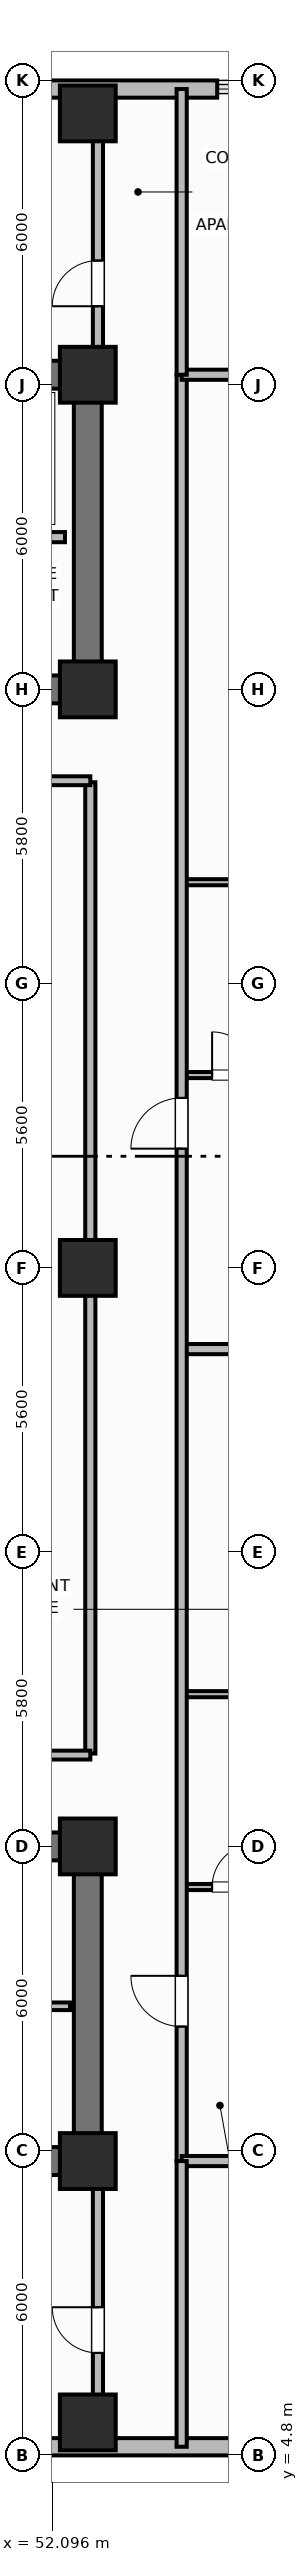
"""IFC4 building model, lengths in metres.
Left out: names, types, materials, properties, quantities, classifications, styles, units other than length and angle.
Written with IfcOpenShell. Run it as: python <this file> out.ifc"""

import sys

from ifc_helpers import new_model, si_unit, direction, frame, frame_2d, origin, origin_2d, place, context, subcontext, project, spatial, rectangle, extrude, element, fill, save


model = new_model("IFC4")
c1 = context("Model", 3, precision=1e-05, world=origin(), true_north=direction((0.0, 1.0)))
c2 = subcontext(c1, "Body", "Model", "MODEL_VIEW")
j1 = project(units=[si_unit("LENGTHUNIT", "METRE"), si_unit("PLANEANGLEUNIT", "RADIAN")], contexts=[c1])
p1 = place(None, origin())
s1 = spatial("IfcSite", under=j1, at=p1, CompositionType="ELEMENT")
p2 = place(p1, origin())
s2 = spatial("IfcBuilding", under=s1, at=p2, CompositionType="ELEMENT")
p3 = place(p2, frame((0.0, 0.0, 99.4)))
s3 = spatial("IfcBuildingStorey", under=s2, at=p3, CompositionType="ELEMENT", Elevation=99.4)
p4 = place(p3, frame((52.8, 10.6, 0.0), z_axis=(0.0, 0.0, 1.0), x_axis=(-1.0, 0.0, 0.0)))
e1 = element("IfcWall", 1, at=p4, inside=s3, PredefinedType="SHEAR", context=c2, shape_type="SweptSolid", body=[
    extrude(rectangle(XDim=27.2, YDim=0.55, at=frame_2d((13.6, 0.0))), origin(), (0.0, 0.0, 1.0), 3.7),
])
p5 = place(p3, frame((52.8, 10.875, 0.0), z_axis=(0.0, 0.0, 1.0), x_axis=(0.0, 1.0, 0.0)))
e2 = element("IfcWall", 2, at=p5, inside=s3, PredefinedType="SHEAR", context=c2, shape_type="SweptSolid", body=[
    extrude(rectangle(XDim=5.65, YDim=0.55, at=frame_2d((2.825, 0.0))), origin(), (0.0, 0.0, 1.0), 3.7),
])
p6 = place(p3, frame((25.6, 16.8, 0.0), z_axis=(0.0, 0.0, 1.0), x_axis=(1.0, 0.0, 0.0)))
e3 = element("IfcWall", 3, at=p6, inside=s3, PredefinedType="SHEAR", context=c2, shape_type="SweptSolid", body=[
    extrude(rectangle(XDim=27.2, YDim=0.55, at=frame_2d((13.6, 0.0))), origin(), (0.0, 0.0, 1.0), 3.7),
])
p7 = place(p6, frame((1.7, 0.0, 0.0)))
e4 = element("IfcOpeningElement", 4, at=p7, cuts=e3, PredefinedType="OPENING", context=c2, shape_type="SweptSolid", body=[
    extrude(rectangle(XDim=1.1, YDim=2.15, at=frame_2d((0.55, 1.075))), frame((0.0, 0.285, 0.0), z_axis=(0.0, -1.0, 0.0), x_axis=(1.0, 0.0, 0.0)), (0.0, 0.0, 1.0), 0.57),
])
p8 = place(p6, frame((4.45, 0.0, 0.0)))
e5 = element("IfcOpeningElement", 5, at=p8, cuts=e3, PredefinedType="OPENING", context=c2, shape_type="SweptSolid", body=[
    extrude(rectangle(XDim=0.85, YDim=2.1, at=frame_2d((0.425, 1.05))), frame((0.0, 0.285, 0.0), z_axis=(0.0, -1.0, 0.0), x_axis=(1.0, 0.0, 0.0)), (0.0, 0.0, 1.0), 0.57),
])
p9 = place(p6, frame((6.5, 0.0, 0.0)))
e6 = element("IfcOpeningElement", 6, at=p9, cuts=e3, PredefinedType="OPENING", context=c2, shape_type="SweptSolid", body=[
    extrude(rectangle(XDim=0.85, YDim=2.1, at=frame_2d((0.425, 1.05))), frame((0.0, 0.285, 0.0), z_axis=(0.0, -1.0, 0.0), x_axis=(1.0, 0.0, 0.0)), (0.0, 0.0, 1.0), 0.57),
])
p10 = place(p6, frame((13.0, 0.0, 0.0)))
e7 = element("IfcOpeningElement", 7, at=p10, cuts=e3, PredefinedType="OPENING", context=c2, shape_type="SweptSolid", body=[
    extrude(rectangle(XDim=1.2, YDim=2.15, at=frame_2d((0.6, 1.075))), frame((0.0, 0.285, 0.0), z_axis=(0.0, -1.0, 0.0), x_axis=(1.0, 0.0, 0.0)), (0.0, 0.0, 1.0), 0.57),
])
p11 = place(p6, frame((19.8, 0.0, 0.0)))
e8 = element("IfcOpeningElement", 8, at=p11, cuts=e3, PredefinedType="OPENING", context=c2, shape_type="SweptSolid", body=[
    extrude(rectangle(XDim=0.85, YDim=2.1, at=frame_2d((0.425, 1.05))), frame((0.0, 0.285, 0.0), z_axis=(0.0, -1.0, 0.0), x_axis=(1.0, 0.0, 0.0)), (0.0, 0.0, 1.0), 0.57),
])
p12 = place(p6, frame((24.2, 0.0, 0.0)))
e9 = element("IfcOpeningElement", 9, at=p12, cuts=e3, PredefinedType="OPENING", context=c2, shape_type="SweptSolid", body=[
    extrude(rectangle(XDim=0.85, YDim=2.1, at=frame_2d((0.425, 1.05))), frame((0.0, 0.285, 0.0), z_axis=(0.0, -1.0, 0.0), x_axis=(1.0, 0.0, 0.0)), (0.0, 0.0, 1.0), 0.57),
])
p13 = place(p3, frame((25.6, 45.8, 0.0), z_axis=(0.0, 0.0, 1.0), x_axis=(1.0, 0.0, 0.0)))
e10 = element("IfcWall", 10, at=p13, inside=s3, PredefinedType="SHEAR", context=c2, shape_type="SweptSolid", body=[
    extrude(rectangle(XDim=27.2, YDim=0.55, at=frame_2d((13.6, 0.0))), origin(), (0.0, 0.0, 1.0), 3.7),
])
p14 = place(p3, frame((52.8, 39.875, 0.0), z_axis=(0.0, 0.0, 1.0), x_axis=(0.0, 1.0, 0.0)))
e11 = element("IfcWall", 11, at=p14, inside=s3, PredefinedType="SHEAR", context=c2, shape_type="SweptSolid", body=[
    extrude(rectangle(XDim=5.65, YDim=0.55, at=frame_2d((2.825, 0.0))), origin(), (0.0, 0.0, 1.0), 3.7),
])
p15 = place(p3, frame((52.8, 39.6, 0.0), z_axis=(0.0, 0.0, 1.0), x_axis=(-1.0, 0.0, 0.0)))
e12 = element("IfcWall", 12, at=p15, inside=s3, PredefinedType="SHEAR", context=c2, shape_type="SweptSolid", body=[
    extrude(rectangle(XDim=27.2, YDim=0.55, at=frame_2d((13.6, 0.0))), origin(), (0.0, 0.0, 1.0), 3.7),
])
p16 = place(p15, frame((24.3, 0.0, 0.0)))
e13 = element("IfcOpeningElement", 13, at=p16, cuts=e12, PredefinedType="OPENING", context=c2, shape_type="SweptSolid", body=[
    extrude(rectangle(XDim=1.1, YDim=2.15, at=frame_2d((0.55, 1.075))), frame((0.0, 0.285, 0.0), z_axis=(0.0, -1.0, 0.0), x_axis=(1.0, 0.0, 0.0)), (0.0, 0.0, 1.0), 0.57),
])
p17 = place(p15, frame((21.85, 0.0, 0.0)))
e14 = element("IfcOpeningElement", 14, at=p17, cuts=e12, PredefinedType="OPENING", context=c2, shape_type="SweptSolid", body=[
    extrude(rectangle(XDim=0.85, YDim=2.1, at=frame_2d((0.425, 1.05))), frame((0.0, 0.285, 0.0), z_axis=(0.0, -1.0, 0.0), x_axis=(1.0, 0.0, 0.0)), (0.0, 0.0, 1.0), 0.57),
])
p18 = place(p15, frame((19.85, 0.0, 0.0)))
e15 = element("IfcOpeningElement", 15, at=p18, cuts=e12, PredefinedType="OPENING", context=c2, shape_type="SweptSolid", body=[
    extrude(rectangle(XDim=0.85, YDim=2.1, at=frame_2d((0.425, 1.05))), frame((0.0, 0.285, 0.0), z_axis=(0.0, -1.0, 0.0), x_axis=(1.0, 0.0, 0.0)), (0.0, 0.0, 1.0), 0.57),
])
p19 = place(p15, frame((15.1, 0.0, 0.0)))
e16 = element("IfcOpeningElement", 16, at=p19, cuts=e12, PredefinedType="OPENING", context=c2, shape_type="SweptSolid", body=[
    extrude(rectangle(XDim=1.2, YDim=2.15, at=frame_2d((0.6, 1.075))), frame((0.0, 0.285, 0.0), z_axis=(0.0, -1.0, 0.0), x_axis=(1.0, 0.0, 0.0)), (0.0, 0.0, 1.0), 0.57),
])
p20 = place(p15, frame((11.3, 0.0, 0.0)))
e17 = element("IfcOpeningElement", 17, at=p20, cuts=e12, PredefinedType="OPENING", context=c2, shape_type="SweptSolid", body=[
    extrude(rectangle(XDim=1.3, YDim=2.2, at=frame_2d((0.65, 1.1))), frame((0.0, 0.285, 0.0), z_axis=(0.0, -1.0, 0.0), x_axis=(1.0, 0.0, 0.0)), (0.0, 0.0, 1.0), 0.57),
])
p21 = place(p15, frame((7.25, 0.0, 0.0)))
e18 = element("IfcOpeningElement", 18, at=p21, cuts=e12, PredefinedType="OPENING", context=c2, shape_type="SweptSolid", body=[
    extrude(rectangle(XDim=0.85, YDim=2.1, at=frame_2d((0.425, 1.05))), frame((0.0, 0.285, 0.0), z_axis=(0.0, -1.0, 0.0), x_axis=(1.0, 0.0, 0.0)), (0.0, 0.0, 1.0), 0.57),
])
p22 = place(p15, frame((4.6, 0.0, 0.0)))
e19 = element("IfcOpeningElement", 19, at=p22, cuts=e12, PredefinedType="OPENING", context=c2, shape_type="SweptSolid", body=[
    extrude(rectangle(XDim=0.85, YDim=2.1, at=frame_2d((0.425, 1.05))), frame((0.0, 0.285, 0.0), z_axis=(0.0, -1.0, 0.0), x_axis=(1.0, 0.0, 0.0)), (0.0, 0.0, 1.0), 0.57),
])
p23 = place(p15, frame((1.9, 0.0, 0.0)))
e20 = element("IfcOpeningElement", 20, at=p23, cuts=e12, PredefinedType="OPENING", context=c2, shape_type="SweptSolid", body=[
    extrude(rectangle(XDim=0.85, YDim=2.1, at=frame_2d((0.425, 1.05))), frame((0.0, 0.285, 0.0), z_axis=(0.0, -1.0, 0.0), x_axis=(1.0, 0.0, 0.0)), (0.0, 0.0, 1.0), 0.57),
])
for number, where, z_axis, x_axis in (
    (21, (52.8, 10.6, 0.0), (0.0, 0.0, 1.0), (1.0, 0.0, 0.0)),
    (22, (52.8, 16.8, 0.0), (0.0, 0.0, 1.0), (1.0, 0.0, 0.0)),
    (23, (52.8, 39.6, 0.0), (0.0, 0.0, 1.0), (1.0, 0.0, 0.0)),
    (24, (52.8, 45.8, 0.0), (0.0, 0.0, 1.0), (1.0, 0.0, 0.0)),
    (25, (52.8, 28.2, 0.0), (0.0, 0.0, 1.0), (1.0, 0.0, 0.0)),
    (26, (52.8, 5.45, 0.0), (0.0, 0.0, 1.0), (1.0, 0.0, 0.0)),
    (27, (52.8, 50.95, 0.0), (0.0, 0.0, 1.0), (1.0, 0.0, 0.0)),
):
    element("IfcColumn", number, at=place(p3, frame(where, z_axis=z_axis, x_axis=x_axis)), inside=s3, PredefinedType="COLUMN", context=c2, shape_type="SweptSolid", body=[
        extrude(rectangle(XDim=1.1, YDim=1.1, at=origin_2d()), origin(), (0.0, 0.0, 1.0), 3.7),
    ])
p24 = place(p3, frame((50.05, 4.97, 0.0), z_axis=(0.0, 0.0, 1.0), x_axis=(1.0, 0.0, 0.0)))
e28 = element("IfcWall", 28, at=p24, inside=s3, PredefinedType="SOLIDWALL", context=c2, shape_type="SweptSolid", body=[
    extrude(rectangle(XDim=9.75, YDim=0.34, at=frame_2d((4.875, 0.0))), origin(), (0.0, 0.0, 1.0), 2.7),
])
p25 = place(p24, frame((5.938, 0.0, 0.68)))
e29 = element("IfcOpeningElement", 29, at=p25, cuts=e28, PredefinedType="OPENING", context=c2, shape_type="SweptSolid", body=[
    extrude(rectangle(XDim=2.1, YDim=1.9, at=frame_2d((1.05, 0.95))), frame((0.0, 0.18, 0.0), z_axis=(0.0, -1.0, 0.0), x_axis=(1.0, 0.0, 0.0)), (0.0, 0.0, 1.0), 0.36),
])
p26 = place(p3, frame((55.35, 51.43, 0.0), z_axis=(0.0, 0.0, 1.0), x_axis=(-1.0, 0.0, 0.0)))
e30 = element("IfcWall", 30, at=p26, inside=s3, PredefinedType="SOLIDWALL", context=c2, shape_type="SweptSolid", body=[
    extrude(rectangle(XDim=12.95, YDim=0.34, at=frame_2d((6.475, 0.0))), origin(), (0.0, 0.0, 1.0), 2.7),
])
p27 = place(p26, frame((5.775, 0.0, 0.73)))
e31 = element("IfcOpeningElement", 31, at=p27, cuts=e30, PredefinedType="OPENING", context=c2, shape_type="SweptSolid", body=[
    extrude(rectangle(XDim=1.4, YDim=1.85, at=frame_2d((0.7, 0.925))), frame((0.0, 0.18, 0.0), z_axis=(0.0, -1.0, 0.0), x_axis=(1.0, 0.0, 0.0)), (0.0, 0.0, 1.0), 0.36),
])
p28 = place(p3, frame((48.05, 13.65, 0.0), z_axis=(0.0, 0.0, 1.0), x_axis=(1.0, 0.0, 0.0)))
e32 = element("IfcWall", 32, at=p28, inside=s3, PredefinedType="PARTITIONING", context=c2, shape_type="SweptSolid", body=[
    extrude(rectangle(XDim=4.4, YDim=0.15, at=frame_2d((2.2, 0.0))), origin(), (0.0, 0.0, 1.0), 2.53),
])
p29 = place(p28, frame((1.6, 0.0, 0.0)))
e33 = element("IfcOpeningElement", 33, at=p29, cuts=e32, PredefinedType="OPENING", context=c2, shape_type="SweptSolid", body=[
    extrude(rectangle(XDim=0.85, YDim=2.1, at=frame_2d((0.425, 1.05))), frame((0.0, 0.085, 0.0), z_axis=(0.0, -1.0, 0.0), x_axis=(1.0, 0.0, 0.0)), (0.0, 0.0, 1.0), 0.17),
])
p30 = place(p3, frame((52.35, 42.6, 0.0), z_axis=(0.0, 0.0, 1.0), x_axis=(-1.0, 0.0, 0.0)))
e34 = element("IfcWall", 34, at=p30, inside=s3, PredefinedType="PARTITIONING", context=c2, shape_type="SweptSolid", body=[
    extrude(rectangle(XDim=8.8, YDim=0.2, at=frame_2d((4.4, 0.0))), origin(), (0.0, 0.0, 1.0), 2.53),
])
p31 = place(p30, frame((7.1, 0.0, 0.0)))
e35 = element("IfcOpeningElement", 35, at=p31, cuts=e34, PredefinedType="OPENING", context=c2, shape_type="SweptSolid", body=[
    extrude(rectangle(XDim=1.0, YDim=2.15, at=frame_2d((0.5, 1.075))), frame((0.0, 0.11, 0.0), z_axis=(0.0, -1.0, 0.0), x_axis=(1.0, 0.0, 0.0)), (0.0, 0.0, 1.0), 0.22),
])
p32 = place(p3, frame((52.85, 18.63, 0.0), z_axis=(0.0, 0.0, 1.0), x_axis=(0.0, 1.0, 0.0)))
e36 = element("IfcWall", 36, at=p32, inside=s3, PredefinedType="PARTITIONING", context=c2, shape_type="SweptSolid", body=[
    extrude(rectangle(XDim=19.14, YDim=0.2, at=frame_2d((9.57, 0.0))), origin(), (0.0, 0.0, 1.0), 2.53),
])
for number, where, z_axis, x_axis in (
    (37, (46.35, 18.6, 0.0), (0.0, 0.0, 1.0), (1.0, 0.0, 0.0)),
    (38, (46.35, 37.8, 0.0), (0.0, 0.0, 1.0), (1.0, 0.0, 0.0)),
):
    element("IfcWall", number, at=place(p3, frame(where, z_axis=z_axis, x_axis=x_axis)), inside=s3, PredefinedType="PARTITIONING", context=c2, shape_type="SweptSolid", body=[
        extrude(rectangle(XDim=6.5, YDim=0.175, at=frame_2d((3.25, 0.0))), origin(), (0.0, 0.0, 1.0), 2.53),
    ])
p33 = place(p3, frame((54.65, 16.0, 0.0), z_axis=(0.0, 0.0, 1.0), x_axis=(1.0, 0.0, 0.0)))
e39 = element("IfcWall", 39, at=p33, inside=s3, PredefinedType="PARTITIONING", context=c2, shape_type="SweptSolid", body=[
    extrude(rectangle(XDim=2.25, YDim=0.12, at=frame_2d((1.125, 0.0))), origin(), (0.0, 0.0, 1.0), 2.53),
])
p34 = place(p33, frame((0.6, 0.0, 0.0)))
e40 = element("IfcOpeningElement", 40, at=p34, cuts=e39, PredefinedType="OPENING", context=c2, shape_type="SweptSolid", body=[
    extrude(rectangle(XDim=0.85, YDim=2.1, at=frame_2d((0.425, 1.05))), frame((0.0, 0.07, 0.0), z_axis=(0.0, -1.0, 0.0), x_axis=(1.0, 0.0, 0.0)), (0.0, 0.0, 1.0), 0.14),
])
p35 = place(p3, frame((54.65, 19.8, 0.0), z_axis=(0.0, 0.0, 1.0), x_axis=(1.0, 0.0, 0.0)))
e41 = element("IfcWall", 41, at=p35, inside=s3, PredefinedType="PARTITIONING", context=c2, shape_type="SweptSolid", body=[
    extrude(rectangle(XDim=2.25, YDim=0.12, at=frame_2d((1.125, 0.0))), origin(), (0.0, 0.0, 1.0), 2.53),
])
p36 = place(p3, frame((54.65, 26.6, 0.0), z_axis=(0.0, 0.0, 1.0), x_axis=(1.0, 0.0, 0.0)))
e42 = element("IfcWall", 42, at=p36, inside=s3, PredefinedType="PARTITIONING", context=c2, shape_type="SweptSolid", body=[
    extrude(rectangle(XDim=8.637, YDim=0.2, at=frame_2d((4.319, 0.0))), origin(), (0.0, 0.0, 1.0), 2.53),
])
p37 = place(p3, frame((54.65, 32.0, 0.0), z_axis=(0.0, 0.0, 1.0), x_axis=(1.0, 0.0, 0.0)))
e43 = element("IfcWall", 43, at=p37, inside=s3, PredefinedType="PARTITIONING", context=c2, shape_type="SweptSolid", body=[
    extrude(rectangle(XDim=2.25, YDim=0.12, at=frame_2d((1.125, 0.0))), origin(), (0.0, 0.0, 1.0), 2.53),
])
p38 = place(p37, frame((0.6, 0.0, 0.0)))
e44 = element("IfcOpeningElement", 44, at=p38, cuts=e43, PredefinedType="OPENING", context=c2, shape_type="SweptSolid", body=[
    extrude(rectangle(XDim=0.85, YDim=2.1, at=frame_2d((0.425, 1.05))), frame((0.0, 0.07, 0.0), z_axis=(0.0, -1.0, 0.0), x_axis=(1.0, 0.0, 0.0)), (0.0, 0.0, 1.0), 0.14),
])
p39 = place(p3, frame((54.65, 35.8, 0.0), z_axis=(0.0, 0.0, 1.0), x_axis=(1.0, 0.0, 0.0)))
e45 = element("IfcWall", 45, at=p39, inside=s3, PredefinedType="PARTITIONING", context=c2, shape_type="SweptSolid", body=[
    extrude(rectangle(XDim=2.25, YDim=0.12, at=frame_2d((1.125, 0.0))), origin(), (0.0, 0.0, 1.0), 2.53),
])
p40 = place(p3, frame((54.65, 10.6, 0.0), z_axis=(0.0, 0.0, 1.0), x_axis=(0.0, 1.0, 0.0)))
e46 = element("IfcWall", 46, at=p40, inside=s3, PredefinedType="PARTITIONING", context=c2, shape_type="SweptSolid", body=[
    extrude(rectangle(XDim=35.2, YDim=0.2, at=frame_2d((17.6, 0.0))), origin(), (0.0, 0.0, 1.0), 2.53),
])
p41 = place(p40, frame((2.65, 0.0, 0.0)))
e47 = element("IfcOpeningElement", 47, at=p41, cuts=e46, PredefinedType="OPENING", context=c2, shape_type="SweptSolid", body=[
    extrude(rectangle(XDim=1.0, YDim=2.15, at=frame_2d((0.5, 1.075))), frame((0.0, 0.11, 0.0), z_axis=(0.0, -1.0, 0.0), x_axis=(1.0, 0.0, 0.0)), (0.0, 0.0, 1.0), 0.22),
])
p42 = place(p40, frame((19.95, 0.0, 0.0)))
e48 = element("IfcOpeningElement", 48, at=p42, cuts=e46, PredefinedType="OPENING", context=c2, shape_type="SweptSolid", body=[
    extrude(rectangle(XDim=1.0, YDim=2.15, at=frame_2d((0.5, 1.075))), frame((0.0, 0.11, 0.0), z_axis=(0.0, -1.0, 0.0), x_axis=(1.0, 0.0, 0.0)), (0.0, 0.0, 1.0), 0.22),
])
for number, where, z_axis, x_axis in (
    (49, (54.65, 10.6, 0.0), (0.0, 0.0, 1.0), (1.0, 0.0, 0.0)),
    (50, (54.65, 45.8, 0.0), (0.0, 0.0, 1.0), (1.0, 0.0, 0.0)),
):
    element("IfcWall", number, at=place(p3, frame(where, z_axis=z_axis, x_axis=x_axis)), inside=s3, PredefinedType="PARTITIONING", context=c2, shape_type="SweptSolid", body=[
        extrude(rectangle(XDim=8.76, YDim=0.2, at=frame_2d((4.38, 0.0))), origin(), (0.0, 0.0, 1.0), 2.53),
    ])
p43 = place(p3, frame((54.65, 4.97, 0.0), z_axis=(0.0, 0.0, 1.0), x_axis=(0.0, 1.0, 0.0)))
e51 = element("IfcWall", 51, at=p43, inside=s3, PredefinedType="PARTITIONING", context=c2, shape_type="SweptSolid", body=[
    extrude(rectangle(XDim=5.63, YDim=0.2, at=frame_2d((2.815, 0.0))), origin(), (0.0, 0.0, 1.0), 2.53),
])
p44 = place(p3, frame((54.65, 45.8, 0.0), z_axis=(0.0, 0.0, 1.0), x_axis=(0.0, 1.0, 0.0)))
e52 = element("IfcWall", 52, at=p44, inside=s3, PredefinedType="PARTITIONING", context=c2, shape_type="SweptSolid", body=[
    extrude(rectangle(XDim=5.63, YDim=0.2, at=frame_2d((2.815, 0.0))), origin(), (0.0, 0.0, 1.0), 2.53),
])
p45 = place(p3, frame((53.0, 5.97, 0.0), z_axis=(0.0, 0.0, 1.0), x_axis=(0.0, 1.0, 0.0)))
e53 = element("IfcWall", 53, at=p45, inside=s3, PredefinedType="PARTITIONING", context=c2, shape_type="SweptSolid", body=[
    extrude(rectangle(XDim=4.33, YDim=0.2, at=frame_2d((2.165, 0.0))), origin(), (0.0, 0.0, 1.0), 2.53),
])
p46 = place(p45, frame((0.85, 0.0, 0.0)))
e54 = element("IfcOpeningElement", 54, at=p46, cuts=e53, PredefinedType="OPENING", context=c2, shape_type="SweptSolid", body=[
    extrude(rectangle(XDim=0.9, YDim=2.1, at=frame_2d((0.45, 1.05))), frame((0.0, 0.11, 0.0), z_axis=(0.0, -1.0, 0.0), x_axis=(1.0, 0.0, 0.0)), (0.0, 0.0, 1.0), 0.22),
])
p47 = place(p3, frame((53.0, 46.1, 0.0), z_axis=(0.0, 0.0, 1.0), x_axis=(0.0, 1.0, 0.0)))
e55 = element("IfcWall", 55, at=p47, inside=s3, PredefinedType="PARTITIONING", context=c2, shape_type="SweptSolid", body=[
    extrude(rectangle(XDim=4.33, YDim=0.2, at=frame_2d((2.165, 0.0))), origin(), (0.0, 0.0, 1.0), 2.53),
])
p48 = place(p47, frame((1.05, 0.0, 0.0)))
e56 = element("IfcOpeningElement", 56, at=p48, cuts=e55, PredefinedType="OPENING", context=c2, shape_type="SweptSolid", body=[
    extrude(rectangle(XDim=0.9, YDim=2.1, at=frame_2d((0.45, 1.05))), frame((0.0, 0.11, 0.0), z_axis=(0.0, -1.0, 0.0), x_axis=(1.0, 0.0, 0.0)), (0.0, 0.0, 1.0), 0.22),
])
p49 = place(p34, origin())
e57 = element("IfcDoor", 57, at=p49, inside=s3, OperationType="SINGLE_SWING_RIGHT", PredefinedType="DOOR", context=c2, shape_type="SweptSolid", body=[
    extrude(rectangle(XDim=0.85, YDim=2.1, at=frame_2d((0.425, 1.05))), frame((0.0, 0.025, 0.0), z_axis=(0.0, -1.0, 0.0), x_axis=(1.0, 0.0, 0.0)), (0.0, 0.0, 1.0), 0.05),
])
fill(e40, e57)
p50 = place(p38, origin())
e58 = element("IfcDoor", 58, at=p50, inside=s3, OperationType="SINGLE_SWING_LEFT", PredefinedType="DOOR", context=c2, shape_type="SweptSolid", body=[
    extrude(rectangle(XDim=0.85, YDim=2.1, at=frame_2d((0.425, 1.05))), frame((0.0, 0.025, 0.0), z_axis=(0.0, -1.0, 0.0), x_axis=(1.0, 0.0, 0.0)), (0.0, 0.0, 1.0), 0.05),
])
fill(e44, e58)
p51 = place(p41, origin())
e59 = element("IfcDoor", 59, at=p51, inside=s3, OperationType="SINGLE_SWING_RIGHT", PredefinedType="DOOR", context=c2, shape_type="SweptSolid", body=[
    extrude(rectangle(XDim=1.0, YDim=2.15, at=frame_2d((0.5, 1.075))), frame((0.0, 0.025, 0.0), z_axis=(0.0, -1.0, 0.0), x_axis=(1.0, 0.0, 0.0)), (0.0, 0.0, 1.0), 0.05),
])
fill(e47, e59)
p52 = place(p42, origin())
e60 = element("IfcDoor", 60, at=p52, inside=s3, OperationType="SINGLE_SWING_LEFT", PredefinedType="DOOR", context=c2, shape_type="SweptSolid", body=[
    extrude(rectangle(XDim=1.0, YDim=2.15, at=frame_2d((0.5, 1.075))), frame((0.0, 0.025, 0.0), z_axis=(0.0, -1.0, 0.0), x_axis=(1.0, 0.0, 0.0)), (0.0, 0.0, 1.0), 0.05),
])
fill(e48, e60)
p53 = place(p46, origin())
e61 = element("IfcDoor", 61, at=p53, inside=s3, OperationType="SINGLE_SWING_RIGHT", PredefinedType="DOOR", context=c2, shape_type="SweptSolid", body=[
    extrude(rectangle(XDim=0.9, YDim=2.1, at=frame_2d((0.45, 1.05))), frame((0.0, 0.025, 0.0), z_axis=(0.0, -1.0, 0.0), x_axis=(1.0, 0.0, 0.0)), (0.0, 0.0, 1.0), 0.05),
])
fill(e54, e61)
p54 = place(p48, origin())
e62 = element("IfcDoor", 62, at=p54, inside=s3, OperationType="SINGLE_SWING_LEFT", PredefinedType="DOOR", context=c2, shape_type="SweptSolid", body=[
    extrude(rectangle(XDim=0.9, YDim=2.1, at=frame_2d((0.45, 1.05))), frame((0.0, 0.025, 0.0), z_axis=(0.0, -1.0, 0.0), x_axis=(1.0, 0.0, 0.0)), (0.0, 0.0, 1.0), 0.05),
])
fill(e56, e62)
save(model, sys.argv[1])
